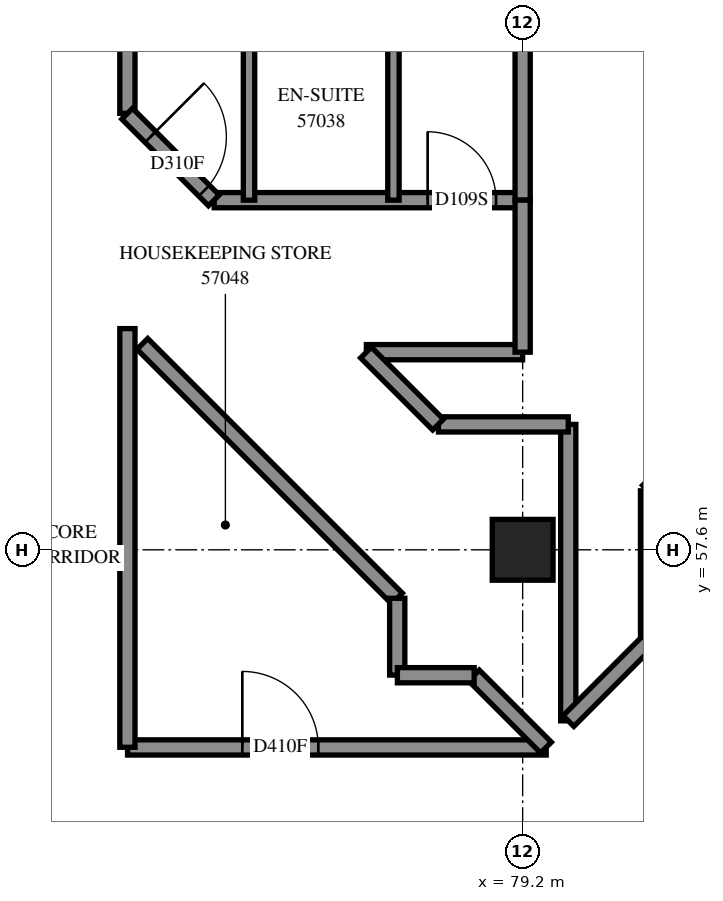
"""IFC4 building model, lengths in metres.
Left out: names, types, materials, properties, quantities, classifications, styles, units other than length and angle.
Written with IfcOpenShell. Run it as: python <this file> out.ifc"""

import sys

from ifc_helpers import new_model, si_unit, direction, frame, frame_2d, origin, origin_2d, place, context, subcontext, project, spatial, rectangle, extrude, element, fill, save


model = new_model("IFC4")
c1 = context("Model", 3, precision=1e-05, world=origin(), true_north=direction((0.0, 1.0)))
c2 = subcontext(c1, "Body", "Model", "MODEL_VIEW")
j1 = project(units=[si_unit("LENGTHUNIT", "METRE"), si_unit("PLANEANGLEUNIT", "RADIAN")], contexts=[c1])
p1 = place(None, origin())
s1 = spatial("IfcSite", under=j1, at=p1, CompositionType="ELEMENT")
p2 = place(p1, origin())
s2 = spatial("IfcBuilding", under=s1, at=p2, CompositionType="ELEMENT")
p3 = place(p2, frame((0.0, 0.0, 210.0)))
s3 = spatial("IfcBuildingStorey", under=s2, at=p3, CompositionType="ELEMENT", Elevation=210.0)
p4 = place(p3, frame((79.2, 57.6, 0.0), z_axis=(0.0, 0.0, 1.0), x_axis=(1.0, 0.0, 0.0)))
e1 = element("IfcColumn", 1, at=p4, inside=s3, PredefinedType="COLUMN", context=c2, shape_type="SweptSolid", body=[
    extrude(rectangle(XDim=0.8, YDim=0.8, at=origin_2d()), origin(), (0.0, 0.0, 1.0), 3.1),
])
p5 = place(p3, frame((76.478, 49.267, -0.3), z_axis=(0.0, 0.0, 1.0), x_axis=(0.7071067812, 0.7071067812, 0.0)))
e2 = element("IfcWall", 2, at=p5, inside=s3, PredefinedType="SHEAR", context=c2, shape_type="SweptSolid", body=[
    extrude(rectangle(XDim=14.4, YDim=0.5, at=frame_2d((7.2, 0.0))), origin(), (0.0, 0.0, 1.0), 2.7),
])
p6 = place(p5, frame((4.55, 0.0, 0.3)))
e3 = element("IfcOpeningElement", 3, at=p6, cuts=e2, PredefinedType="OPENING", context=c2, shape_type="SweptSolid", body=[
    extrude(rectangle(XDim=1.1, YDim=2.1, at=frame_2d((0.55, 1.05))), frame((0.0, 0.26, 0.0), z_axis=(0.0, -1.0, 0.0), x_axis=(1.0, 0.0, 0.0)), (0.0, 0.0, 1.0), 0.52),
])
p7 = place(p5, frame((11.35, 0.0, 0.3)))
e4 = element("IfcOpeningElement", 4, at=p7, cuts=e2, PredefinedType="OPENING", context=c2, shape_type="SweptSolid", body=[
    extrude(rectangle(XDim=1.1, YDim=2.1, at=frame_2d((0.55, 1.05))), frame((0.0, 0.26, 0.0), z_axis=(0.0, -1.0, 0.0), x_axis=(1.0, 0.0, 0.0)), (0.0, 0.0, 1.0), 0.52),
])
p8 = place(p3, frame((80.849, 58.377, 0.0), z_axis=(0.0, 0.0, 1.0), x_axis=(0.7071067812, 0.7071067812, 0.0)))
e5 = element("IfcWall", 5, at=p8, inside=s3, PredefinedType="PARTITIONING", context=c2, shape_type="SweptSolid", body=[
    extrude(rectangle(XDim=9.413, YDim=0.2, at=frame_2d((4.707, 0.0))), origin(), (0.0, 0.0, 1.0), 3.1),
])
p9 = place(p3, frame((74.002, 55.0, 0.0), z_axis=(0.0, 0.0, 1.0), x_axis=(1.0, 0.0, 0.0)))
e6 = element("IfcWall", 6, at=p9, inside=s3, PredefinedType="PARTITIONING", context=c2, shape_type="SweptSolid", body=[
    extrude(rectangle(XDim=5.508, YDim=0.2, at=frame_2d((2.754, 0.0))), origin(), (0.0, 0.0, 1.0), 3.1),
])
p10 = place(p9, frame((1.51, 0.0, 0.0)))
e7 = element("IfcOpeningElement", 7, at=p10, cuts=e6, PredefinedType="OPENING", context=c2, shape_type="SweptSolid", body=[
    extrude(rectangle(XDim=1.0, YDim=2.1, at=frame_2d((0.5, 1.05))), frame((0.0, 0.11, 0.0), z_axis=(0.0, -1.0, 0.0), x_axis=(1.0, 0.0, 0.0)), (0.0, 0.0, 1.0), 0.22),
])
p11 = place(p3, frame((74.0, 55.002, 0.0), z_axis=(0.0, 0.0, 1.0), x_axis=(0.0, 1.0, 0.0)))
e8 = element("IfcWall", 8, at=p11, inside=s3, PredefinedType="PARTITIONING", context=c2, shape_type="SweptSolid", body=[
    extrude(rectangle(XDim=5.508, YDim=0.2, at=frame_2d((2.754, 0.0))), origin(), (0.0, 0.0, 1.0), 3.1),
])
p12 = place(p3, frame((74.197, 60.309, 0.0), z_axis=(0.0, 0.0, 1.0), x_axis=(0.7071067812, -0.7071067812, 0.0)))
e9 = element("IfcWall", 9, at=p12, inside=s3, PredefinedType="PARTITIONING", context=c2, shape_type="SweptSolid", body=[
    extrude(rectangle(XDim=4.738, YDim=0.2, at=frame_2d((2.369, 0.0))), origin(), (0.0, 0.0, 1.0), 3.1),
])
p13 = place(p3, frame((75.142, 62.2, 0.0), z_axis=(0.0, 0.0, 1.0), x_axis=(1.0, 0.0, 0.0)))
e10 = element("IfcWall", 10, at=p13, inside=s3, PredefinedType="PARTITIONING", context=c2, shape_type="SweptSolid", body=[
    extrude(rectangle(XDim=4.058, YDim=0.2, at=frame_2d((2.029, 0.0))), origin(), (0.0, 0.0, 1.0), 3.1),
])
p14 = place(p13, frame((2.808, 0.0, 0.0)))
e11 = element("IfcOpeningElement", 11, at=p14, cuts=e10, PredefinedType="OPENING", context=c2, shape_type="SweptSolid", body=[
    extrude(rectangle(XDim=0.9, YDim=2.1, at=frame_2d((0.45, 1.05))), frame((0.0, 0.11, 0.0), z_axis=(0.0, -1.0, 0.0), x_axis=(1.0, 0.0, 0.0)), (0.0, 0.0, 1.0), 0.22),
])
p15 = place(p3, frame((79.8, 55.35, 0.0), z_axis=(0.0, 0.0, 1.0), x_axis=(0.0, 1.0, 0.0)))
e12 = element("IfcWall", 12, at=p15, inside=s3, PredefinedType="PARTITIONING", context=c2, shape_type="SweptSolid", body=[
    extrude(rectangle(XDim=3.9, YDim=0.2, at=frame_2d((1.95, 0.0))), origin(), (0.0, 0.0, 1.0), 3.1),
])
p16 = place(p3, frame((74.0, 63.342, 0.0), z_axis=(0.0, 0.0, 1.0), x_axis=(0.0, 1.0, 0.0)))
e13 = element("IfcWall", 13, at=p16, inside=s3, PredefinedType="PARTITIONING", context=c2, shape_type="SweptSolid", body=[
    extrude(rectangle(XDim=3.458, YDim=0.2, at=frame_2d((1.729, 0.0))), origin(), (0.0, 0.0, 1.0), 3.1),
])
for number, where, z_axis, x_axis in (
    (14, (75.6, 62.2, 0.0), (0.0, 0.0, 1.0), (0.0, 1.0, 0.0)),
    (15, (77.5, 62.2, 0.0), (0.0, 0.0, 1.0), (0.0, 1.0, 0.0)),
):
    element("IfcWall", number, at=place(p3, frame(where, z_axis=z_axis, x_axis=x_axis)), inside=s3, PredefinedType="PARTITIONING", context=c2, shape_type="SweptSolid", body=[
        extrude(rectangle(XDim=2.4, YDim=0.15, at=frame_2d((1.2, 0.0))), origin(), (0.0, 0.0, 1.0), 3.1),
    ])
p17 = place(p3, frame((79.2, 62.2, 0.0), z_axis=(0.0, 0.0, 1.0), x_axis=(0.0, 1.0, 0.0)))
e16 = element("IfcWall", 16, at=p17, inside=s3, PredefinedType="PARTITIONING", context=c2, shape_type="SweptSolid", body=[
    extrude(rectangle(XDim=2.2, YDim=0.2, at=frame_2d((1.1, 0.0))), origin(), (0.0, 0.0, 1.0), 3.1),
])
p18 = place(p3, frame((77.144, 60.2, 0.0), z_axis=(0.0, 0.0, 1.0), x_axis=(1.0, 0.0, 0.0)))
e17 = element("IfcWall", 17, at=p18, inside=s3, PredefinedType="PARTITIONING", context=c2, shape_type="SweptSolid", body=[
    extrude(rectangle(XDim=2.056, YDim=0.2, at=frame_2d((1.028, 0.0))), origin(), (0.0, 0.0, 1.0), 3.1),
])
p19 = place(p3, frame((79.2, 60.2, 0.0), z_axis=(0.0, 0.0, 1.0), x_axis=(0.0, 1.0, 0.0)))
e18 = element("IfcWall", 18, at=p19, inside=s3, PredefinedType="PARTITIONING", context=c2, shape_type="SweptSolid", body=[
    extrude(rectangle(XDim=2.0, YDim=0.2, at=frame_2d((1.0, 0.0))), origin(), (0.0, 0.0, 1.0), 3.1),
])
p20 = place(p3, frame((80.85, 56.49, 0.0), z_axis=(0.0, 0.0, 1.0), x_axis=(0.0, 1.0, 0.0)))
e19 = element("IfcWall", 19, at=p20, inside=s3, PredefinedType="PARTITIONING", context=c2, shape_type="SweptSolid", body=[
    extrude(rectangle(XDim=1.886, YDim=0.2, at=frame_2d((0.943, 0.0))), origin(), (0.0, 0.0, 1.0), 3.1),
])
p21 = place(p3, frame((78.092, 59.25, 0.0), z_axis=(0.0, 0.0, 1.0), x_axis=(1.0, 0.0, 0.0)))
e20 = element("IfcWall", 20, at=p21, inside=s3, PredefinedType="PARTITIONING", context=c2, shape_type="SweptSolid", body=[
    extrude(rectangle(XDim=1.708, YDim=0.2, at=frame_2d((0.854, 0.0))), origin(), (0.0, 0.0, 1.0), 3.1),
])
p22 = place(p3, frame((73.997, 63.337, 0.0), z_axis=(0.0, 0.0, 1.0), x_axis=(0.7071067812, -0.7071067812, 0.0)))
e21 = element("IfcWall", 21, at=p22, inside=s3, PredefinedType="PARTITIONING", context=c2, shape_type="SweptSolid", body=[
    extrude(rectangle(XDim=1.612, YDim=0.2, at=frame_2d((0.806, 0.0))), origin(), (0.0, 0.0, 1.0), 3.1),
])
p23 = place(p22, frame((0.432, 0.0, 0.0)))
e22 = element("IfcOpeningElement", 22, at=p23, cuts=e21, PredefinedType="OPENING", context=c2, shape_type="SweptSolid", body=[
    extrude(rectangle(XDim=1.0, YDim=2.1, at=frame_2d((0.5, 1.05))), frame((0.0, 0.11, 0.0), z_axis=(0.0, -1.0, 0.0), x_axis=(1.0, 0.0, 0.0)), (0.0, 0.0, 1.0), 0.22),
])
p24 = place(p3, frame((79.803, 55.347, 0.0), z_axis=(0.0, 0.0, 1.0), x_axis=(0.706460727, 0.7077522457, 0.0)))
e23 = element("IfcWall", 23, at=p24, inside=s3, PredefinedType="PARTITIONING", context=c2, shape_type="SweptSolid", body=[
    extrude(rectangle(XDim=1.549, YDim=0.2, at=frame_2d((0.774, 0.0))), origin(), (0.0, 0.0, 1.0), 3.1),
])
for number, where, z_axis, x_axis in (
    (24, (78.559, 55.947, 0.0), (0.0, 0.0, 1.0), (0.707, -0.707, 0.0)),
    (25, (77.139, 60.195, 0.0), (0.0, 0.0, 1.0), (0.707, -0.707, 0.0)),
):
    element("IfcWall", number, at=place(p3, frame(where, z_axis=z_axis, x_axis=x_axis)), inside=s3, PredefinedType="PARTITIONING", context=c2, shape_type="SweptSolid", body=[
        extrude(rectangle(XDim=1.341, YDim=0.2, at=frame_2d((0.67, 0.0))), origin(), (0.0, 0.0, 1.0), 3.1),
    ])
for number, where, z_axis, x_axis in (
    (26, (77.55, 55.952, 0.0), (0.0, 0.0, 1.0), (0.0, 1.0, 0.0)),
    (27, (77.552, 55.95, 0.0), (0.0, 0.0, 1.0), (1.0, 0.0, 0.0)),
):
    element("IfcWall", number, at=place(p3, frame(where, z_axis=z_axis, x_axis=x_axis)), inside=s3, PredefinedType="PARTITIONING", context=c2, shape_type="SweptSolid", body=[
        extrude(rectangle(XDim=1.01, YDim=0.2, at=frame_2d((0.505, 0.0))), origin(), (0.0, 0.0, 1.0), 3.1),
    ])
p25 = place(p23, origin())
e28 = element("IfcDoor", 28, at=p25, inside=s3, OperationType="SINGLE_SWING_RIGHT", PredefinedType="DOOR", context=c2, shape_type="SweptSolid", body=[
    extrude(rectangle(XDim=1.0, YDim=2.1, at=frame_2d((0.5, 1.05))), frame((0.0, 0.025, 0.0), z_axis=(0.0, -1.0, 0.0), x_axis=(1.0, 0.0, 0.0)), (0.0, 0.0, 1.0), 0.05),
])
fill(e22, e28)
p26 = place(p14, origin())
e29 = element("IfcDoor", 29, at=p26, inside=s3, OperationType="SINGLE_SWING_LEFT", PredefinedType="DOOR", context=c2, shape_type="SweptSolid", body=[
    extrude(rectangle(XDim=0.9, YDim=2.1, at=frame_2d((0.45, 1.05))), frame((0.0, 0.025, 0.0), z_axis=(0.0, -1.0, 0.0), x_axis=(1.0, 0.0, 0.0)), (0.0, 0.0, 1.0), 0.05),
])
fill(e11, e29)
p27 = place(p10, origin())
e30 = element("IfcDoor", 30, at=p27, inside=s3, OperationType="SINGLE_SWING_LEFT", PredefinedType="DOOR", context=c2, shape_type="SweptSolid", body=[
    extrude(rectangle(XDim=1.0, YDim=2.1, at=frame_2d((0.5, 1.05))), frame((0.0, 0.025, 0.0), z_axis=(0.0, -1.0, 0.0), x_axis=(1.0, 0.0, 0.0)), (0.0, 0.0, 1.0), 0.05),
])
fill(e7, e30)
save(model, sys.argv[1])
